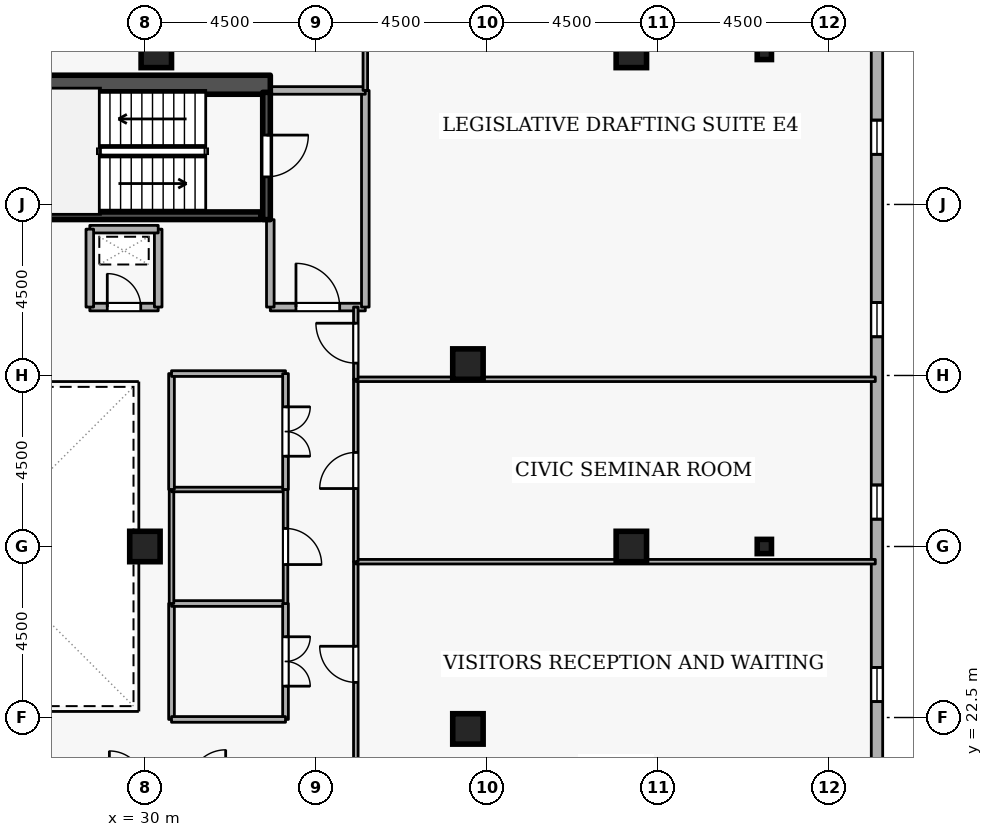
"""IFC4 building model, lengths in metres.
Left out: names, types, materials, properties, quantities, classifications, styles, units other than length and angle.
Written with IfcOpenShell. Run it as: python <this file> out.ifc"""

import sys

from ifc_helpers import new_model, si_unit, direction, frame, frame_2d, origin, origin_2d, place, context, subcontext, project, spatial, rectangle, i_section, extrude, element, fill, save


model = new_model("IFC4")
c1 = context("Model", 3, precision=1e-05, world=origin(), true_north=direction((0.0, 1.0)))
c2 = subcontext(c1, "Body", "Model", "MODEL_VIEW")
j1 = project(units=[si_unit("LENGTHUNIT", "METRE"), si_unit("PLANEANGLEUNIT", "RADIAN")], contexts=[c1])
p1 = place(None, origin())
s1 = spatial("IfcSite", under=j1, at=p1, CompositionType="ELEMENT")
p2 = place(p1, origin())
s2 = spatial("IfcBuilding", under=s1, at=p2, CompositionType="ELEMENT")
p3 = place(p2, frame((0.0, 0.0, 272.7)))
s3 = spatial("IfcBuildingStorey", under=s2, at=p3, CompositionType="ELEMENT", Elevation=272.7)
p4 = place(p3, frame((17.7, 39.15, 0.0), z_axis=(0.0, 0.0, 1.0), x_axis=(1.0, 0.0, 0.0)))
e1 = element("IfcWall", 1, at=p4, inside=s3, PredefinedType="SHEAR", context=c2, shape_type="SweptSolid", body=[
    extrude(rectangle(XDim=15.6, YDim=0.5, at=frame_2d((7.8, 0.0))), origin(), (0.0, 0.0, 1.0), 3.6),
])
for number, where, z_axis, x_axis in (
    (2, (42.8, 27.0, 0.0), (0.0, 0.0, 1.0), (1.0, 0.0, 0.0)),
    (3, (42.8, 40.0, 0.0), (0.0, 0.0, 1.0), (1.0, 0.0, 0.0)),
    (4, (38.5, 22.2, 0.0), (0.0, 0.0, 1.0), (1.0, 0.0, 0.0)),
    (5, (38.5, 31.8, 0.0), (0.0, 0.0, 1.0), (1.0, 0.0, 0.0)),
    (6, (30.3, 40.0, 0.0), (0.0, 0.0, 1.0), (1.0, 0.0, 0.0)),
    (7, (30.0, 27.0, 0.0), (0.0, 0.0, 1.0), (1.0, 0.0, 0.0)),
):
    element("IfcColumn", number, at=place(p3, frame(where, z_axis=z_axis, x_axis=x_axis)), inside=s3, PredefinedType="COLUMN", context=c2, shape_type="SweptSolid", body=[
        extrude(rectangle(XDim=0.8, YDim=0.8, at=origin_2d()), origin(), (0.0, 0.0, 1.0), 3.6),
    ])
for number, where, z_axis, x_axis in (
    (8, (46.3, 27.0, 0.0), (0.0, 0.0, 1.0), (1.0, 0.0, 0.0)),
    (9, (46.3, 40.0, 0.0), (0.0, 0.0, 1.0), (1.0, 0.0, 0.0)),
):
    element("IfcColumn", number, at=place(p3, frame(where, z_axis=z_axis, x_axis=x_axis)), inside=s3, PredefinedType="COLUMN", context=c2, shape_type="SweptSolid", body=[
        extrude(i_section(OverallWidth=0.375, OverallDepth=0.375, WebThickness=0.017, FlangeThickness=0.027, FilletRadius=0.015, at=origin_2d()), origin(), (0.0, 0.0, 1.0), 3.6),
    ])
p5 = place(p3, frame((49.265, 5.819, 0.0), z_axis=(0.0, 0.0, 1.0), x_axis=(-2.7061402e-05, 0.999999999634, 0.0)))
e10 = element("IfcWall", 10, at=p5, inside=s3, PredefinedType="STANDARD", context=c2, shape_type="SweptSolid", body=[
    extrude(rectangle(XDim=36.087, YDim=0.3, at=frame_2d((18.043, 0.0))), origin(), (0.0, 0.0, 1.0), 2.7),
])
p6 = place(p5, frame((2.7, 0.0, 0.72)))
e11 = element("IfcOpeningElement", 11, at=p6, cuts=e10, PredefinedType="OPENING", context=c2, shape_type="SweptSolid", body=[
    extrude(rectangle(XDim=0.9, YDim=1.75, at=frame_2d((0.45, 0.875))), frame((0.0, 0.16, 0.0), z_axis=(0.0, -1.0, 0.0), x_axis=(1.0, 0.0, 0.0)), (0.0, 0.0, 1.0), 0.32),
])
p7 = place(p5, frame((7.5, 0.0, 0.72)))
e12 = element("IfcOpeningElement", 12, at=p7, cuts=e10, PredefinedType="OPENING", context=c2, shape_type="SweptSolid", body=[
    extrude(rectangle(XDim=0.9, YDim=1.75, at=frame_2d((0.45, 0.875))), frame((0.0, 0.16, 0.0), z_axis=(0.0, -1.0, 0.0), x_axis=(1.0, 0.0, 0.0)), (0.0, 0.0, 1.0), 0.32),
])
p8 = place(p5, frame((12.3, 0.0, 0.72)))
e13 = element("IfcOpeningElement", 13, at=p8, cuts=e10, PredefinedType="OPENING", context=c2, shape_type="SweptSolid", body=[
    extrude(rectangle(XDim=0.9, YDim=1.75, at=frame_2d((0.45, 0.875))), frame((0.0, 0.16, 0.0), z_axis=(0.0, -1.0, 0.0), x_axis=(1.0, 0.0, 0.0)), (0.0, 0.0, 1.0), 0.32),
])
p9 = place(p5, frame((17.1, 0.0, 0.72)))
e14 = element("IfcOpeningElement", 14, at=p9, cuts=e10, PredefinedType="OPENING", context=c2, shape_type="SweptSolid", body=[
    extrude(rectangle(XDim=0.9, YDim=1.75, at=frame_2d((0.45, 0.875))), frame((0.0, 0.16, 0.0), z_axis=(0.0, -1.0, 0.0), x_axis=(1.0, 0.0, 0.0)), (0.0, 0.0, 1.0), 0.32),
])
p10 = place(p5, frame((21.9, 0.0, 0.72)))
e15 = element("IfcOpeningElement", 15, at=p10, cuts=e10, PredefinedType="OPENING", context=c2, shape_type="SweptSolid", body=[
    extrude(rectangle(XDim=0.9, YDim=1.75, at=frame_2d((0.45, 0.875))), frame((0.0, 0.16, 0.0), z_axis=(0.0, -1.0, 0.0), x_axis=(1.0, 0.0, 0.0)), (0.0, 0.0, 1.0), 0.32),
])
p11 = place(p5, frame((26.7, 0.0, 0.72)))
e16 = element("IfcOpeningElement", 16, at=p11, cuts=e10, PredefinedType="OPENING", context=c2, shape_type="SweptSolid", body=[
    extrude(rectangle(XDim=0.9, YDim=1.75, at=frame_2d((0.45, 0.875))), frame((0.0, 0.16, 0.0), z_axis=(0.0, -1.0, 0.0), x_axis=(1.0, 0.0, 0.0)), (0.0, 0.0, 1.0), 0.32),
])
p12 = place(p5, frame((31.5, 0.0, 0.72)))
e17 = element("IfcOpeningElement", 17, at=p12, cuts=e10, PredefinedType="OPENING", context=c2, shape_type="SweptSolid", body=[
    extrude(rectangle(XDim=0.9, YDim=1.75, at=frame_2d((0.45, 0.875))), frame((0.0, 0.16, 0.0), z_axis=(0.0, -1.0, 0.0), x_axis=(1.0, 0.0, 0.0)), (0.0, 0.0, 1.0), 0.32),
])
p13 = place(p3, frame((33.2, 38.95, 0.0), z_axis=(0.0, 0.0, 1.0), x_axis=(0.0, -1.0, 0.0)))
e18 = element("IfcWall", 18, at=p13, inside=s3, PredefinedType="SHEAR", context=c2, shape_type="SweptSolid", body=[
    extrude(rectangle(XDim=3.35, YDim=0.2, at=frame_2d((1.675, 0.0))), origin(), (0.0, 0.0, 1.0), 3.6),
])
p14 = place(p13, frame((1.125, 0.0, 0.0)))
e19 = element("IfcOpeningElement", 19, at=p14, cuts=e18, PredefinedType="OPENING", context=c2, shape_type="SweptSolid", body=[
    extrude(rectangle(XDim=1.1, YDim=2.1, at=frame_2d((0.55, 1.05))), frame((0.0, 0.11, 0.0), z_axis=(0.0, -1.0, 0.0), x_axis=(1.0, 0.0, 0.0)), (0.0, 0.0, 1.0), 0.22),
])
p15 = place(p3, frame((25.95, 35.703, 0.0), z_axis=(0.0, 0.0, 1.0), x_axis=(1.0, 0.0, 0.0)))
e20 = element("IfcWall", 20, at=p15, inside=s3, PredefinedType="SHEAR", context=c2, shape_type="SweptSolid", body=[
    extrude(rectangle(XDim=7.1, YDim=0.2, at=frame_2d((3.55, 0.0))), origin(), (0.0, 0.0, 1.0), 3.6),
])
p16 = place(p3, frame((33.3, 33.3, 0.0), z_axis=(0.0, 0.0, 1.0), x_axis=(1.0, 0.0, 0.0)))
e21 = element("IfcWall", 21, at=p16, inside=s3, PredefinedType="STANDARD", context=c2, shape_type="SweptSolid", body=[
    extrude(rectangle(XDim=2.5, YDim=0.2, at=frame_2d((1.25, 0.0))), origin(), (0.0, 0.0, 1.0), 3.34),
])
p17 = place(p16, frame((0.675, 0.0, 0.0)))
e22 = element("IfcOpeningElement", 22, at=p17, cuts=e21, PredefinedType="OPENING", context=c2, shape_type="SweptSolid", body=[
    extrude(rectangle(XDim=1.15, YDim=2.1, at=frame_2d((0.575, 1.05))), frame((0.0, 0.11, 0.0), z_axis=(0.0, -1.0, 0.0), x_axis=(1.0, 0.0, 0.0)), (0.0, 0.0, 1.0), 0.22),
])
p18 = place(p3, frame((35.8, 33.3, 0.0), z_axis=(0.0, 0.0, 1.0), x_axis=(0.0, 1.0, 0.0)))
e23 = element("IfcWall", 23, at=p18, inside=s3, PredefinedType="STANDARD", context=c2, shape_type="SweptSolid", body=[
    extrude(rectangle(XDim=5.7, YDim=0.2, at=frame_2d((2.85, 0.0))), origin(), (0.0, 0.0, 1.0), 3.34),
])
p19 = place(p3, frame((35.8, 39.0, 0.0), z_axis=(0.0, 0.0, 1.0), x_axis=(-1.0, 0.0, 0.0)))
e24 = element("IfcWall", 24, at=p19, inside=s3, PredefinedType="STANDARD", context=c2, shape_type="SweptSolid", body=[
    extrude(rectangle(XDim=2.5, YDim=0.2, at=frame_2d((1.25, 0.0))), origin(), (0.0, 0.0, 1.0), 3.34),
])
p20 = place(p3, frame((33.3, 35.6, 0.0), z_axis=(0.0, 0.0, 1.0), x_axis=(0.0, -1.0, 0.0)))
e25 = element("IfcWall", 25, at=p20, inside=s3, PredefinedType="STANDARD", context=c2, shape_type="SweptSolid", body=[
    extrude(rectangle(XDim=2.3, YDim=0.2, at=frame_2d((1.15, 0.0))), origin(), (0.0, 0.0, 1.0), 2.545),
])
p21 = place(p3, frame((28.55, 33.3, 0.0), z_axis=(0.0, 0.0, 1.0), x_axis=(1.0, 0.0, 0.0)))
e26 = element("IfcWall", 26, at=p21, inside=s3, PredefinedType="STANDARD", context=c2, shape_type="SweptSolid", body=[
    extrude(rectangle(XDim=1.8, YDim=0.2, at=frame_2d((0.9, 0.0))), origin(), (0.0, 0.0, 1.0), 3.34),
])
p22 = place(p21, frame((0.46, 0.0, 0.0)))
e27 = element("IfcOpeningElement", 27, at=p22, cuts=e26, PredefinedType="OPENING", context=c2, shape_type="SweptSolid", body=[
    extrude(rectangle(XDim=0.88, YDim=2.04, at=frame_2d((0.44, 1.02))), frame((0.0, 0.11, 0.0), z_axis=(0.0, -1.0, 0.0), x_axis=(1.0, 0.0, 0.0)), (0.0, 0.0, 1.0), 0.22),
])
p23 = place(p3, frame((30.35, 33.3, 0.0), z_axis=(0.0, 0.0, 1.0), x_axis=(0.0, 1.0, 0.0)))
e28 = element("IfcWall", 28, at=p23, inside=s3, PredefinedType="STANDARD", context=c2, shape_type="SweptSolid", body=[
    extrude(rectangle(XDim=2.05, YDim=0.2, at=frame_2d((1.025, 0.0))), origin(), (0.0, 0.0, 1.0), 3.34),
])
p24 = place(p3, frame((30.35, 35.35, 0.0), z_axis=(0.0, 0.0, 1.0), x_axis=(-1.0, 0.0, 0.0)))
e29 = element("IfcWall", 29, at=p24, inside=s3, PredefinedType="STANDARD", context=c2, shape_type="SweptSolid", body=[
    extrude(rectangle(XDim=1.8, YDim=0.2, at=frame_2d((0.9, 0.0))), origin(), (0.0, 0.0, 1.0), 3.34),
])
p25 = place(p3, frame((28.55, 35.35, 0.0), z_axis=(0.0, 0.0, 1.0), x_axis=(0.0, -1.0, 0.0)))
e30 = element("IfcWall", 30, at=p25, inside=s3, PredefinedType="STANDARD", context=c2, shape_type="SweptSolid", body=[
    extrude(rectangle(XDim=2.05, YDim=0.2, at=frame_2d((1.025, 0.0))), origin(), (0.0, 0.0, 1.0), 3.34),
])
p26 = place(p3, frame((35.55, 21.2, 0.0), z_axis=(0.0, 0.0, 1.0), x_axis=(0.0, 1.0, 0.0)))
e31 = element("IfcWall", 31, at=p26, inside=s3, PredefinedType="PARTITIONING", context=c2, shape_type="SweptSolid", body=[
    extrude(rectangle(XDim=5.4, YDim=0.12, at=frame_2d((2.7, 0.0))), origin(), (0.0, 0.0, 1.0), 3.34),
])
p27 = place(p26, frame((2.225, 0.0, 0.0)))
e32 = element("IfcOpeningElement", 32, at=p27, cuts=e31, PredefinedType="OPENING", context=c2, shape_type="SweptSolid", body=[
    extrude(rectangle(XDim=0.95, YDim=2.1, at=frame_2d((0.475, 1.05))), frame((0.0, 0.07, 0.0), z_axis=(0.0, -1.0, 0.0), x_axis=(1.0, 0.0, 0.0)), (0.0, 0.0, 1.0), 0.14),
])
p28 = place(p3, frame((35.55, 26.6, 0.0), z_axis=(0.0, 0.0, 1.0), x_axis=(1.0, 0.0, 0.0)))
e33 = element("IfcWall", 33, at=p28, inside=s3, PredefinedType="PARTITIONING", context=c2, shape_type="SweptSolid", body=[
    extrude(rectangle(XDim=13.67, YDim=0.12, at=frame_2d((6.835, 0.0))), origin(), (0.0, 0.0, 1.0), 3.34),
])
p29 = place(p3, frame((35.55, 26.6, 0.0), z_axis=(0.0, 0.0, 1.0), x_axis=(0.0, 1.0, 0.0)))
e34 = element("IfcWall", 34, at=p29, inside=s3, PredefinedType="PARTITIONING", context=c2, shape_type="SweptSolid", body=[
    extrude(rectangle(XDim=4.8, YDim=0.12, at=frame_2d((2.4, 0.0))), origin(), (0.0, 0.0, 1.0), 3.34),
])
p30 = place(p29, frame((1.925, 0.0, 0.0)))
e35 = element("IfcOpeningElement", 35, at=p30, cuts=e34, PredefinedType="OPENING", context=c2, shape_type="SweptSolid", body=[
    extrude(rectangle(XDim=0.95, YDim=2.1, at=frame_2d((0.475, 1.05))), frame((0.0, 0.07, 0.0), z_axis=(0.0, -1.0, 0.0), x_axis=(1.0, 0.0, 0.0)), (0.0, 0.0, 1.0), 0.14),
])
p31 = place(p3, frame((35.55, 31.4, 0.0), z_axis=(0.0, 0.0, 1.0), x_axis=(1.0, 0.0, 0.0)))
e36 = element("IfcWall", 36, at=p31, inside=s3, PredefinedType="PARTITIONING", context=c2, shape_type="SweptSolid", body=[
    extrude(rectangle(XDim=13.67, YDim=0.12, at=frame_2d((6.835, 0.0))), origin(), (0.0, 0.0, 1.0), 3.34),
])
p32 = place(p3, frame((35.8, 39.0, 0.0), z_axis=(0.0, 0.0, 1.0), x_axis=(0.0, 1.0, 0.0)))
e37 = element("IfcWall", 37, at=p32, inside=s3, PredefinedType="PARTITIONING", context=c2, shape_type="SweptSolid", body=[
    extrude(rectangle(XDim=5.72, YDim=0.12, at=frame_2d((2.86, 0.0))), origin(), (0.0, 0.0, 1.0), 3.34),
])
p33 = place(p3, frame((35.55, 31.4, 0.0), z_axis=(0.0, 0.0, 1.0), x_axis=(0.0, 1.0, 0.0)))
e38 = element("IfcWall", 38, at=p33, inside=s3, PredefinedType="PARTITIONING", context=c2, shape_type="SweptSolid", body=[
    extrude(rectangle(XDim=1.9, YDim=0.12, at=frame_2d((0.95, 0.0))), origin(), (0.0, 0.0, 1.0), 3.34),
])
p34 = place(p33, frame((0.425, 0.0, 0.0)))
e39 = element("IfcOpeningElement", 39, at=p34, cuts=e38, PredefinedType="OPENING", context=c2, shape_type="SweptSolid", body=[
    extrude(rectangle(XDim=1.05, YDim=2.1, at=frame_2d((0.525, 1.05))), frame((0.0, 0.07, 0.0), z_axis=(0.0, -1.0, 0.0), x_axis=(1.0, 0.0, 0.0)), (0.0, 0.0, 1.0), 0.14),
])
p35 = place(p3, frame((30.7, 22.45, 0.0), z_axis=(0.0, 0.0, 1.0), x_axis=(0.0, 1.0, 0.0)))
e40 = element("IfcWall", 40, at=p35, inside=s3, PredefinedType="PARTITIONING", context=c2, shape_type="SweptSolid", body=[
    extrude(rectangle(XDim=3.05, YDim=0.15, at=frame_2d((1.525, 0.0))), origin(), (0.0, 0.0, 1.0), 3.34),
])
p36 = place(p3, frame((30.7, 25.5, 0.0), z_axis=(0.0, 0.0, 1.0), x_axis=(1.0, 0.0, 0.0)))
e41 = element("IfcWall", 41, at=p36, inside=s3, PredefinedType="PARTITIONING", context=c2, shape_type="SweptSolid", body=[
    extrude(rectangle(XDim=3.0, YDim=0.15, at=frame_2d((1.5, 0.0))), origin(), (0.0, 0.0, 1.0), 3.34),
])
p37 = place(p3, frame((33.7, 25.5, 0.0), z_axis=(0.0, 0.0, 1.0), x_axis=(0.0, -1.0, 0.0)))
e42 = element("IfcWall", 42, at=p37, inside=s3, PredefinedType="PARTITIONING", context=c2, shape_type="SweptSolid", body=[
    extrude(rectangle(XDim=3.05, YDim=0.15, at=frame_2d((1.525, 0.0))), origin(), (0.0, 0.0, 1.0), 3.34),
])
p38 = place(p37, frame((0.875, 0.0, 0.0)))
e43 = element("IfcOpeningElement", 43, at=p38, cuts=e42, PredefinedType="OPENING", context=c2, shape_type="SweptSolid", body=[
    extrude(rectangle(XDim=1.3, YDim=2.12, at=frame_2d((0.65, 1.06))), frame((0.0, 0.085, 0.0), z_axis=(0.0, -1.0, 0.0), x_axis=(1.0, 0.0, 0.0)), (0.0, 0.0, 1.0), 0.17),
])
p39 = place(p3, frame((33.7, 22.45, 0.0), z_axis=(0.0, 0.0, 1.0), x_axis=(-1.0, 0.0, 0.0)))
e44 = element("IfcWall", 44, at=p39, inside=s3, PredefinedType="PARTITIONING", context=c2, shape_type="SweptSolid", body=[
    extrude(rectangle(XDim=3.0, YDim=0.15, at=frame_2d((1.5, 0.0))), origin(), (0.0, 0.0, 1.0), 3.34),
])
for number, where, z_axis, x_axis in (
    (45, (30.7, 25.5, 0.0), (0.0, 0.0, 1.0), (0.0, 1.0, 0.0)),
    (46, (30.7, 28.5, 0.0), (0.0, 0.0, 1.0), (1.0, 0.0, 0.0)),
):
    element("IfcWall", number, at=place(p3, frame(where, z_axis=z_axis, x_axis=x_axis)), inside=s3, PredefinedType="PARTITIONING", context=c2, shape_type="SweptSolid", body=[
        extrude(rectangle(XDim=3.0, YDim=0.12, at=frame_2d((1.5, 0.0))), origin(), (0.0, 0.0, 1.0), 3.34),
    ])
p40 = place(p3, frame((33.7, 28.5, 0.0), z_axis=(0.0, 0.0, 1.0), x_axis=(0.0, -1.0, 0.0)))
e47 = element("IfcWall", 47, at=p40, inside=s3, PredefinedType="PARTITIONING", context=c2, shape_type="SweptSolid", body=[
    extrude(rectangle(XDim=3.0, YDim=0.12, at=frame_2d((1.5, 0.0))), origin(), (0.0, 0.0, 1.0), 3.34),
])
p41 = place(p40, frame((1.025, 0.0, 0.0)))
e48 = element("IfcOpeningElement", 48, at=p41, cuts=e47, PredefinedType="OPENING", context=c2, shape_type="SweptSolid", body=[
    extrude(rectangle(XDim=0.95, YDim=2.1, at=frame_2d((0.475, 1.05))), frame((0.0, 0.07, 0.0), z_axis=(0.0, -1.0, 0.0), x_axis=(1.0, 0.0, 0.0)), (0.0, 0.0, 1.0), 0.14),
])
p42 = place(p3, frame((30.7, 28.5, 0.0), z_axis=(0.0, 0.0, 1.0), x_axis=(0.0, 1.0, 0.0)))
e49 = element("IfcWall", 49, at=p42, inside=s3, PredefinedType="PARTITIONING", context=c2, shape_type="SweptSolid", body=[
    extrude(rectangle(XDim=3.05, YDim=0.15, at=frame_2d((1.525, 0.0))), origin(), (0.0, 0.0, 1.0), 3.34),
])
p43 = place(p3, frame((30.7, 31.55, 0.0), z_axis=(0.0, 0.0, 1.0), x_axis=(1.0, 0.0, 0.0)))
e50 = element("IfcWall", 50, at=p43, inside=s3, PredefinedType="PARTITIONING", context=c2, shape_type="SweptSolid", body=[
    extrude(rectangle(XDim=3.0, YDim=0.15, at=frame_2d((1.5, 0.0))), origin(), (0.0, 0.0, 1.0), 3.34),
])
p44 = place(p3, frame((33.7, 31.55, 0.0), z_axis=(0.0, 0.0, 1.0), x_axis=(0.0, -1.0, 0.0)))
e51 = element("IfcWall", 51, at=p44, inside=s3, PredefinedType="PARTITIONING", context=c2, shape_type="SweptSolid", body=[
    extrude(rectangle(XDim=3.05, YDim=0.15, at=frame_2d((1.525, 0.0))), origin(), (0.0, 0.0, 1.0), 3.34),
])
p45 = place(p44, frame((0.875, 0.0, 0.0)))
e52 = element("IfcOpeningElement", 52, at=p45, cuts=e51, PredefinedType="OPENING", context=c2, shape_type="SweptSolid", body=[
    extrude(rectangle(XDim=1.3, YDim=2.12, at=frame_2d((0.65, 1.06))), frame((0.0, 0.085, 0.0), z_axis=(0.0, -1.0, 0.0), x_axis=(1.0, 0.0, 0.0)), (0.0, 0.0, 1.0), 0.17),
])
p46 = place(p9, origin())
e53 = element("IfcWindow", 53, at=p46, inside=s3, PartitioningType="SINGLE_PANEL", PredefinedType="WINDOW", context=c2, shape_type="SweptSolid", body=[
    extrude(rectangle(XDim=0.9, YDim=1.75, at=frame_2d((0.45, 0.875))), frame((0.0, 0.03, 0.0), z_axis=(0.0, -1.0, 0.0), x_axis=(1.0, 0.0, 0.0)), (0.0, 0.0, 1.0), 0.06),
])
fill(e14, e53)
p47 = place(p10, origin())
e54 = element("IfcWindow", 54, at=p47, inside=s3, PartitioningType="SINGLE_PANEL", PredefinedType="WINDOW", context=c2, shape_type="SweptSolid", body=[
    extrude(rectangle(XDim=0.9, YDim=1.75, at=frame_2d((0.45, 0.875))), frame((0.0, 0.03, 0.0), z_axis=(0.0, -1.0, 0.0), x_axis=(1.0, 0.0, 0.0)), (0.0, 0.0, 1.0), 0.06),
])
fill(e15, e54)
p48 = place(p11, origin())
e55 = element("IfcWindow", 55, at=p48, inside=s3, PartitioningType="SINGLE_PANEL", PredefinedType="WINDOW", context=c2, shape_type="SweptSolid", body=[
    extrude(rectangle(XDim=0.9, YDim=1.75, at=frame_2d((0.45, 0.875))), frame((0.0, 0.03, 0.0), z_axis=(0.0, -1.0, 0.0), x_axis=(1.0, 0.0, 0.0)), (0.0, 0.0, 1.0), 0.06),
])
fill(e16, e55)
p49 = place(p12, origin())
e56 = element("IfcWindow", 56, at=p49, inside=s3, PartitioningType="SINGLE_PANEL", PredefinedType="WINDOW", context=c2, shape_type="SweptSolid", body=[
    extrude(rectangle(XDim=0.9, YDim=1.75, at=frame_2d((0.45, 0.875))), frame((0.0, 0.03, 0.0), z_axis=(0.0, -1.0, 0.0), x_axis=(1.0, 0.0, 0.0)), (0.0, 0.0, 1.0), 0.06),
])
fill(e17, e56)
p50 = place(p14, origin())
e57 = element("IfcDoor", 57, at=p50, inside=s3, OperationType="SINGLE_SWING_LEFT", PredefinedType="DOOR", context=c2, shape_type="SweptSolid", body=[
    extrude(rectangle(XDim=1.1, YDim=2.1, at=frame_2d((0.55, 1.05))), frame((0.0, 0.025, 0.0), z_axis=(0.0, -1.0, 0.0), x_axis=(1.0, 0.0, 0.0)), (0.0, 0.0, 1.0), 0.05),
])
fill(e19, e57)
p51 = place(p17, origin())
e58 = element("IfcDoor", 58, at=p51, inside=s3, OperationType="SINGLE_SWING_LEFT", PredefinedType="DOOR", context=c2, shape_type="SweptSolid", body=[
    extrude(rectangle(XDim=1.15, YDim=2.1, at=frame_2d((0.575, 1.05))), frame((0.0, 0.025, 0.0), z_axis=(0.0, -1.0, 0.0), x_axis=(1.0, 0.0, 0.0)), (0.0, 0.0, 1.0), 0.05),
])
fill(e22, e58)
p52 = place(p22, origin())
e59 = element("IfcDoor", 59, at=p52, inside=s3, OperationType="SINGLE_SWING_LEFT", PredefinedType="DOOR", context=c2, shape_type="SweptSolid", body=[
    extrude(rectangle(XDim=0.88, YDim=2.04, at=frame_2d((0.44, 1.02))), frame((0.0, 0.025, 0.0), z_axis=(0.0, -1.0, 0.0), x_axis=(1.0, 0.0, 0.0)), (0.0, 0.0, 1.0), 0.05),
])
fill(e27, e59)
p53 = place(p27, origin())
e60 = element("IfcDoor", 60, at=p53, inside=s3, OperationType="SINGLE_SWING_RIGHT", PredefinedType="DOOR", context=c2, shape_type="SweptSolid", body=[
    extrude(rectangle(XDim=0.95, YDim=2.1, at=frame_2d((0.475, 1.05))), frame((0.0, 0.025, 0.0), z_axis=(0.0, -1.0, 0.0), x_axis=(1.0, 0.0, 0.0)), (0.0, 0.0, 1.0), 0.05),
])
fill(e32, e60)
p54 = place(p30, origin())
e61 = element("IfcDoor", 61, at=p54, inside=s3, OperationType="SINGLE_SWING_LEFT", PredefinedType="DOOR", context=c2, shape_type="SweptSolid", body=[
    extrude(rectangle(XDim=0.95, YDim=2.1, at=frame_2d((0.475, 1.05))), frame((0.0, 0.025, 0.0), z_axis=(0.0, -1.0, 0.0), x_axis=(1.0, 0.0, 0.0)), (0.0, 0.0, 1.0), 0.05),
])
fill(e35, e61)
p55 = place(p34, origin())
e62 = element("IfcDoor", 62, at=p55, inside=s3, OperationType="SINGLE_SWING_RIGHT", PredefinedType="DOOR", context=c2, shape_type="SweptSolid", body=[
    extrude(rectangle(XDim=1.05, YDim=2.1, at=frame_2d((0.525, 1.05))), frame((0.0, 0.025, 0.0), z_axis=(0.0, -1.0, 0.0), x_axis=(1.0, 0.0, 0.0)), (0.0, 0.0, 1.0), 0.05),
])
fill(e39, e62)
p56 = place(p38, origin())
e63 = element("IfcDoor", 63, at=p56, inside=s3, OperationType="DOUBLE_DOOR_SINGLE_SWING", PredefinedType="DOOR", context=c2, shape_type="SweptSolid", body=[
    extrude(rectangle(XDim=1.3, YDim=2.12, at=frame_2d((0.65, 1.06))), frame((0.0, 0.025, 0.0), z_axis=(0.0, -1.0, 0.0), x_axis=(1.0, 0.0, 0.0)), (0.0, 0.0, 1.0), 0.05),
])
fill(e43, e63)
p57 = place(p41, origin())
e64 = element("IfcDoor", 64, at=p57, inside=s3, OperationType="SINGLE_SWING_RIGHT", PredefinedType="DOOR", context=c2, shape_type="SweptSolid", body=[
    extrude(rectangle(XDim=0.95, YDim=2.1, at=frame_2d((0.475, 1.05))), frame((0.0, 0.025, 0.0), z_axis=(0.0, -1.0, 0.0), x_axis=(1.0, 0.0, 0.0)), (0.0, 0.0, 1.0), 0.05),
])
fill(e48, e64)
p58 = place(p45, origin())
e65 = element("IfcDoor", 65, at=p58, inside=s3, OperationType="DOUBLE_DOOR_SINGLE_SWING", PredefinedType="DOOR", context=c2, shape_type="SweptSolid", body=[
    extrude(rectangle(XDim=1.3, YDim=2.12, at=frame_2d((0.65, 1.06))), frame((0.0, 0.025, 0.0), z_axis=(0.0, -1.0, 0.0), x_axis=(1.0, 0.0, 0.0)), (0.0, 0.0, 1.0), 0.05),
])
fill(e52, e65)
save(model, sys.argv[1])
